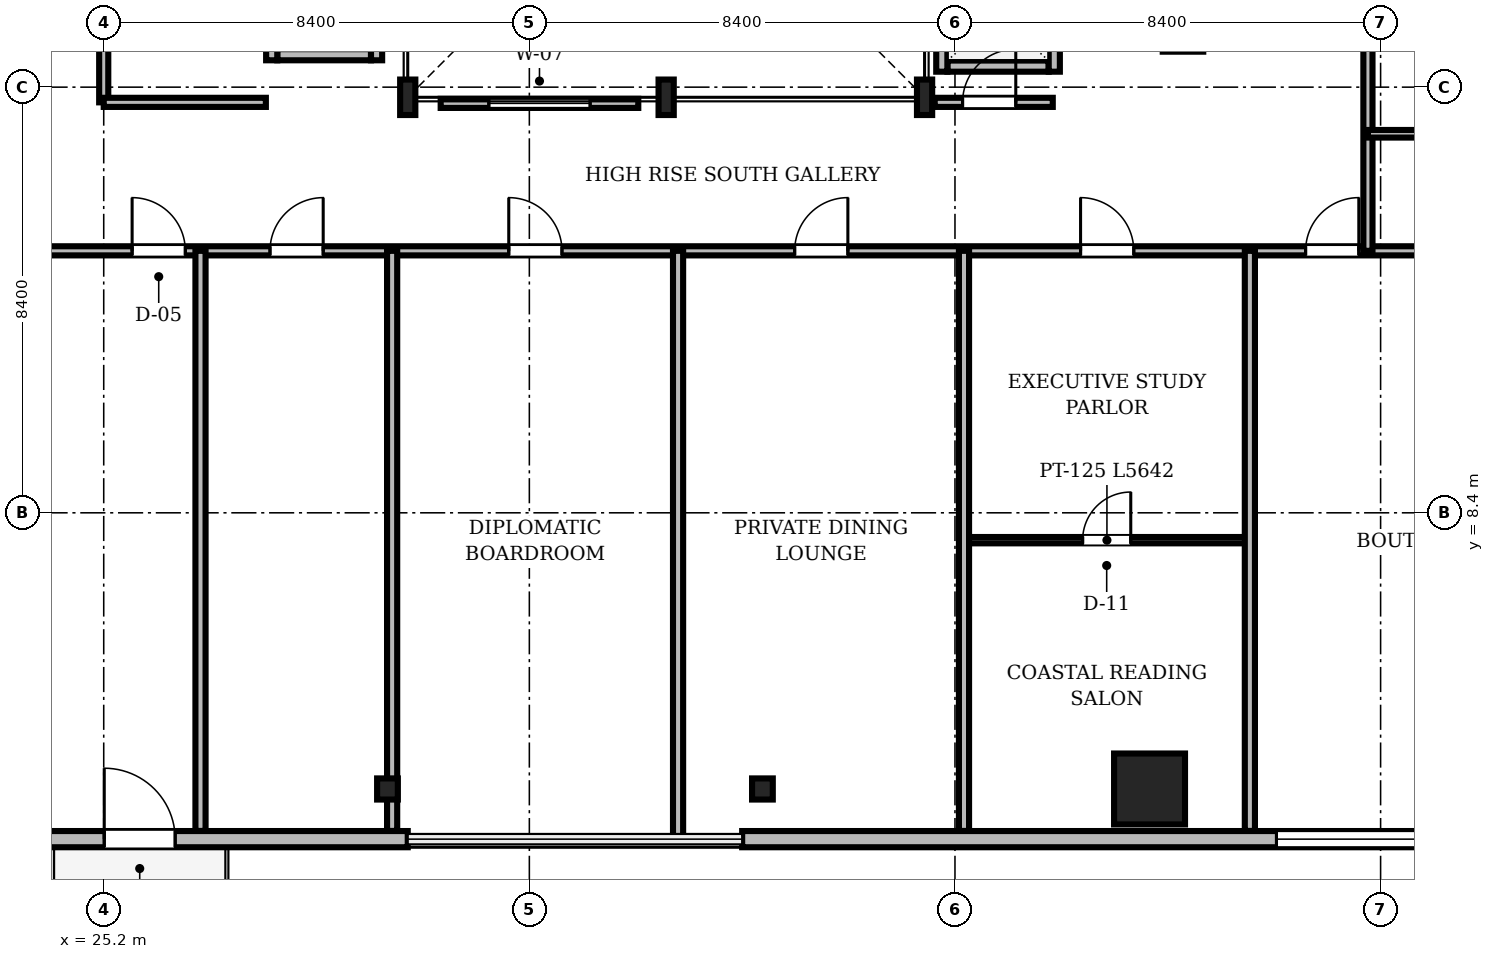
"""IFC4 building model, lengths in metres.
Left out: names, types, materials, properties, quantities, classifications, styles, units other than length and angle.
Written with IfcOpenShell. Run it as: python <this file> out.ifc"""

import sys

from ifc_helpers import new_model, si_unit, direction, frame, frame_2d, origin, origin_2d, place, context, subcontext, project, spatial, rectangle, i_section, extrude, source, transform, mapped, element, fill, save


model = new_model("IFC4")
c1 = context("Model", 3, precision=1e-05, world=origin(), true_north=direction((0.0, 1.0)))
c2 = subcontext(c1, "Body", "Model", "MODEL_VIEW")
j1 = project(units=[si_unit("LENGTHUNIT", "METRE"), si_unit("PLANEANGLEUNIT", "RADIAN")], contexts=[c1])
p1 = place(None, origin())
s1 = spatial("IfcSite", under=j1, at=p1, CompositionType="ELEMENT")
p2 = place(p1, origin())
s2 = spatial("IfcBuilding", under=s1, at=p2, CompositionType="ELEMENT")
p3 = place(p2, frame((0.0, 0.0, 233.55)))
s3 = spatial("IfcBuildingStorey", under=s2, at=p3, CompositionType="ELEMENT", Elevation=233.55)
m1 = source(origin(), c2, "Body", "SweptSolid", [
    extrude(i_section(OverallWidth=0.3, OverallDepth=0.7, WebThickness=0.017, FlangeThickness=0.032, FilletRadius=0.027, at=origin_2d()), origin(), (0.0, 0.0, 1.0), 3.1),
])
for number, where, z_axis, x_axis in (
    (1, (31.2, 16.6, 0.0), (0.0, 0.0, 1.0), (1.0, 0.0, 0.0)),
    (2, (36.3, 16.6, 0.0), (0.0, 0.0, 1.0), (1.0, 0.0, 0.0)),
    (3, (41.4, 16.6, 0.0), (0.0, 0.0, 1.0), (1.0, 0.0, 0.0)),
):
    element("IfcColumn", number, at=place(p3, frame(where, z_axis=z_axis, x_axis=x_axis)), inside=s3, PredefinedType="COLUMN", context=c2, shape_type="MappedRepresentation", body=[
        mapped(m1, transform((0.0, 0.0, 0.0), scale=1.0)),
    ])
m2 = source(origin(), c2, "Body", "SweptSolid", [
    extrude(rectangle(XDim=1.4, YDim=1.4, at=origin_2d()), origin(), (0.0, 0.0, 1.0), 3.1),
])
p4 = place(p3, frame((45.84, 2.95, 0.0), z_axis=(0.0, 0.0, 1.0), x_axis=(1.0, 0.0, 0.0)))
e4 = element("IfcColumn", 4, at=p4, inside=s3, PredefinedType="COLUMN", context=c2, shape_type="MappedRepresentation", body=[
    mapped(m2, transform((0.0, 0.0, 0.0), scale=1.0)),
])
m3 = source(origin(), c2, "Body", "SweptSolid", [
    extrude(i_section(OverallWidth=0.409, OverallDepth=0.417, WebThickness=0.021, FlangeThickness=0.033, FilletRadius=0.015, at=origin_2d()), origin(), (0.0, 0.0, 1.0), 3.1),
])
for number, where, z_axis, x_axis in (
    (5, (30.8, 2.95, 0.0), (0.0, 0.0, 1.0), (1.0, 0.0, 0.0)),
    (6, (38.2, 2.95, 0.0), (0.0, 0.0, 1.0), (1.0, 0.0, 0.0)),
):
    element("IfcColumn", number, at=place(p3, frame(where, z_axis=z_axis, x_axis=x_axis)), inside=s3, PredefinedType="COLUMN", context=c2, shape_type="MappedRepresentation", body=[
        mapped(m3, transform((0.0, 0.0, 0.0), scale=1.0)),
    ])
m4 = source(origin(), c2, "Body", "SweptSolid", [
    extrude(rectangle(XDim=15.6, YDim=0.32, at=frame_2d((7.8, 0.0))), origin(), (0.0, 0.0, 1.0), 3.1),
])
p5 = place(p3, frame((15.6, 1.96, 0.0), z_axis=(0.0, 0.0, 1.0), x_axis=(1.0, 0.0, 0.0)))
e7 = element("IfcWall", 7, at=p5, inside=s3, PredefinedType="SOLIDWALL", context=c2, shape_type="MappedRepresentation", body=[
    mapped(m4, transform((0.0, 0.0, 0.0), scale=1.0)),
])
m5 = source(origin(), c2, "Body", "SweptSolid", [
    extrude(rectangle(XDim=1.4, YDim=2.3, at=frame_2d((0.7, 1.15))), frame((0.0, 0.17, 0.0), z_axis=(0.0, -1.0, 0.0), x_axis=(1.0, 0.0, 0.0)), (0.0, 0.0, 1.0), 0.34),
])
p6 = place(p5, frame((9.61, 0.0, 0.0)))
e8 = element("IfcOpeningElement", 8, at=p6, cuts=e7, PredefinedType="OPENING", context=c2, shape_type="MappedRepresentation", body=[
    mapped(m5, transform((0.0, 0.0, 0.0), scale=1.0)),
])
m6 = source(origin(), c2, "Body", "SweptSolid", [
    extrude(rectangle(XDim=2.8, YDim=2.4, at=frame_2d((1.4, 1.2))), frame((0.0, 0.17, 0.0), z_axis=(0.0, -1.0, 0.0), x_axis=(1.0, 0.0, 0.0)), (0.0, 0.0, 1.0), 0.34),
])
p7 = place(p5, frame((2.705, 0.0, 0.44)))
e9 = element("IfcOpeningElement", 9, at=p7, cuts=e7, PredefinedType="OPENING", context=c2, shape_type="MappedRepresentation", body=[
    mapped(m6, transform((0.0, 0.0, 0.0), scale=1.0)),
])
p8 = place(p3, frame((37.8, 1.96, 0.0), z_axis=(0.0, 0.0, 1.0), x_axis=(1.0, 0.0, 0.0)))
e10 = element("IfcWall", 10, at=p8, inside=s3, PredefinedType="SOLIDWALL", context=c2, shape_type="MappedRepresentation", body=[
    mapped(m4, transform((0.0, 0.0, 0.0), scale=1.0)),
])
p9 = place(p8, frame((10.545, 0.0, 0.44)))
e11 = element("IfcOpeningElement", 11, at=p9, cuts=e10, PredefinedType="OPENING", context=c2, shape_type="MappedRepresentation", body=[
    mapped(m6, transform((0.0, 0.0, 0.0), scale=1.0)),
])
m7 = source(origin(), c2, "Body", "SweptSolid", [
    extrude(rectangle(XDim=2.0, YDim=0.22, at=frame_2d((1.0, 0.0))), origin(), (0.0, 0.0, 1.0), 3.1),
])
p10 = place(p3, frame((41.85, 17.215, 0.0), z_axis=(0.0, 0.0, 1.0), x_axis=(1.0, 0.0, 0.0)))
e12 = element("IfcWall", 12, at=p10, inside=s3, PredefinedType="SOLIDWALL", context=c2, shape_type="MappedRepresentation", body=[
    mapped(m7, transform((0.0, 0.0, 0.0), scale=1.0)),
])
m8 = source(origin(), c2, "Body", "SweptSolid", [
    extrude(rectangle(XDim=2.19, YDim=0.22, at=frame_2d((1.095, 0.0))), origin(), (0.0, 0.0, 1.0), 3.1),
])
p11 = place(p3, frame((41.74, 17.105, 0.0), z_axis=(0.0, 0.0, 1.0), x_axis=(0.0, 1.0, 0.0)))
e13 = element("IfcWall", 13, at=p11, inside=s3, PredefinedType="SOLIDWALL", context=c2, shape_type="MappedRepresentation", body=[
    mapped(m8, transform((0.0, 0.0, 0.0), scale=1.0)),
])
p12 = place(p3, frame((43.96, 17.105, 0.0), z_axis=(0.0, 0.0, 1.0), x_axis=(0.0, 1.0, 0.0)))
e14 = element("IfcWall", 14, at=p12, inside=s3, PredefinedType="SOLIDWALL", context=c2, shape_type="MappedRepresentation", body=[
    mapped(m8, transform((0.0, 0.0, 0.0), scale=1.0)),
])
m9 = source(origin(), c2, "Body", "SweptSolid", [
    extrude(rectangle(XDim=1.1, YDim=2.2, at=frame_2d((0.55, 1.1))), frame((0.0, 0.12, 0.0), z_axis=(0.0, -1.0, 0.0), x_axis=(1.0, 0.0, 0.0)), (0.0, 0.0, 1.0), 0.24),
])
p13 = place(p12, frame((0.545, 0.0, 0.0)))
e15 = element("IfcOpeningElement", 15, at=p13, cuts=e14, PredefinedType="OPENING", context=c2, shape_type="MappedRepresentation", body=[
    mapped(m9, transform((0.0, 0.0, 0.0), scale=1.0)),
])
m10 = source(origin(), c2, "Body", "SweptSolid", [
    extrude(rectangle(XDim=1.85, YDim=0.22, at=frame_2d((0.925, 0.0))), origin(), (0.0, 0.0, 1.0), 2.542),
])
p14 = place(p3, frame((28.625, 17.44, 0.0), z_axis=(0.0, 0.0, 1.0), x_axis=(1.0, 0.0, 0.0)))
e16 = element("IfcWall", 16, at=p14, inside=s3, PredefinedType="SOLIDWALL", context=c2, shape_type="MappedRepresentation", body=[
    mapped(m10, transform((0.0, 0.0, 0.0), scale=1.0)),
])
m11 = source(origin(), c2, "Body", "SweptSolid", [
    extrude(rectangle(XDim=2.54, YDim=0.22, at=frame_2d((1.27, 0.0))), origin(), (0.0, 0.0, 1.0), 2.542),
])
p15 = place(p3, frame((28.515, 17.33, 0.0), z_axis=(0.0, 0.0, 1.0), x_axis=(0.0, 1.0, 0.0)))
e17 = element("IfcWall", 17, at=p15, inside=s3, PredefinedType="SOLIDWALL", context=c2, shape_type="MappedRepresentation", body=[
    mapped(m11, transform((0.0, 0.0, 0.0), scale=1.0)),
])
m12 = source(origin(), c2, "Body", "SweptSolid", [
    extrude(rectangle(XDim=2.54, YDim=0.22, at=frame_2d((1.27, 0.0))), origin(), (0.0, 0.0, 1.0), 3.1),
])
p16 = place(p3, frame((30.585, 17.33, 0.0), z_axis=(0.0, 0.0, 1.0), x_axis=(0.0, 1.0, 0.0)))
e18 = element("IfcWall", 18, at=p16, inside=s3, PredefinedType="SOLIDWALL", context=c2, shape_type="MappedRepresentation", body=[
    mapped(m12, transform((0.0, 0.0, 0.0), scale=1.0)),
])
m13 = source(origin(), c2, "Body", "SweptSolid", [
    extrude(rectangle(XDim=46.156, YDim=0.18, at=frame_2d((23.078, 0.0))), origin(), (0.0, 0.0, 1.0), 2.376),
])
p17 = place(p3, frame((11.422, 13.57, 0.0), z_axis=(0.0, 0.0, 1.0), x_axis=(1.0, 0.0, 0.0)))
e19 = element("IfcWall", 19, at=p17, inside=s3, PredefinedType="PARTITIONING", context=c2, shape_type="MappedRepresentation", body=[
    mapped(m13, transform((0.0, 0.0, 0.0), scale=1.0)),
])
m14 = source(origin(), c2, "Body", "SweptSolid", [
    extrude(rectangle(XDim=1.05, YDim=2.2, at=frame_2d((0.525, 1.1))), frame((0.0, 0.1, 0.0), z_axis=(0.0, -1.0, 0.0), x_axis=(1.0, 0.0, 0.0)), (0.0, 0.0, 1.0), 0.2),
])
p18 = place(p17, frame((14.338, 0.0, 0.0)))
e20 = element("IfcOpeningElement", 20, at=p18, cuts=e19, PredefinedType="OPENING", context=c2, shape_type="MappedRepresentation", body=[
    mapped(m14, transform((0.0, 0.0, 0.0), scale=1.0)),
])
p19 = place(p17, frame((17.059, 0.0, 0.0)))
e21 = element("IfcOpeningElement", 21, at=p19, cuts=e19, PredefinedType="OPENING", context=c2, shape_type="MappedRepresentation", body=[
    mapped(m14, transform((0.0, 0.0, 0.0), scale=1.0)),
])
p20 = place(p17, frame((21.772, 0.0, 0.0)))
e22 = element("IfcOpeningElement", 22, at=p20, cuts=e19, PredefinedType="OPENING", context=c2, shape_type="MappedRepresentation", body=[
    mapped(m14, transform((0.0, 0.0, 0.0), scale=1.0)),
])
p21 = place(p17, frame((27.414, 0.0, 0.0)))
e23 = element("IfcOpeningElement", 23, at=p21, cuts=e19, PredefinedType="OPENING", context=c2, shape_type="MappedRepresentation", body=[
    mapped(m14, transform((0.0, 0.0, 0.0), scale=1.0)),
])
p22 = place(p17, frame((33.057, 0.0, 0.0)))
e24 = element("IfcOpeningElement", 24, at=p22, cuts=e19, PredefinedType="OPENING", context=c2, shape_type="MappedRepresentation", body=[
    mapped(m14, transform((0.0, 0.0, 0.0), scale=1.0)),
])
p23 = place(p17, frame((37.498, 0.0, 0.0)))
e25 = element("IfcOpeningElement", 25, at=p23, cuts=e19, PredefinedType="OPENING", context=c2, shape_type="MappedRepresentation", body=[
    mapped(m14, transform((0.0, 0.0, 0.0), scale=1.0)),
])
m15 = source(origin(), c2, "Body", "SweptSolid", [
    extrude(rectangle(XDim=27.53, YDim=0.18, at=frame_2d((13.765, 0.0))), origin(), (0.0, 0.0, 1.0), 2.542),
])
p24 = place(p3, frame((50.15, 13.57, 0.0), z_axis=(0.0, 0.0, 1.0), x_axis=(0.0, 1.0, 0.0)))
e26 = element("IfcWall", 26, at=p24, inside=s3, PredefinedType="PARTITIONING", context=c2, shape_type="MappedRepresentation", body=[
    mapped(m15, transform((0.0, 0.0, 0.0), scale=1.0)),
])
p25 = place(p24, frame((5.217, 0.0, 0.0)))
e27 = element("IfcOpeningElement", 27, at=p25, cuts=e26, PredefinedType="OPENING", context=c2, shape_type="MappedRepresentation", body=[
    mapped(m14, transform((0.0, 0.0, 0.0), scale=1.0)),
])
p26 = place(p24, frame((14.32, 0.0, 0.0)))
e28 = element("IfcOpeningElement", 28, at=p26, cuts=e26, PredefinedType="OPENING", context=c2, shape_type="MappedRepresentation", body=[
    mapped(m14, transform((0.0, 0.0, 0.0), scale=1.0)),
])
p27 = place(p24, frame((23.423, 0.0, 0.0)))
e29 = element("IfcOpeningElement", 29, at=p27, cuts=e26, PredefinedType="OPENING", context=c2, shape_type="MappedRepresentation", body=[
    mapped(m14, transform((0.0, 0.0, 0.0), scale=1.0)),
])
m16 = source(origin(), c2, "Body", "SweptSolid", [
    extrude(rectangle(XDim=11.94, YDim=0.18, at=frame_2d((5.97, 0.0))), origin(), (0.0, 0.0, 1.0), 2.542),
])
p28 = place(p3, frame((25.2, 16.5, 0.0), z_axis=(0.0, 0.0, 1.0), x_axis=(0.0, 1.0, 0.0)))
e30 = element("IfcWall", 30, at=p28, inside=s3, PredefinedType="PARTITIONING", context=c2, shape_type="MappedRepresentation", body=[
    mapped(m16, transform((0.0, 0.0, 0.0), scale=1.0)),
])
p29 = place(p28, frame((4.5, 0.0, 0.0)))
e31 = element("IfcOpeningElement", 31, at=p29, cuts=e30, PredefinedType="OPENING", context=c2, shape_type="MappedRepresentation", body=[
    mapped(m14, transform((0.0, 0.0, 0.0), scale=1.0)),
])
m17 = source(origin(), c2, "Body", "SweptSolid", [
    extrude(rectangle(XDim=5.642, YDim=0.125, at=frame_2d((2.821, 0.0))), origin(), (0.0, 0.0, 1.0), 2.542),
])
p30 = place(p3, frame((42.178, 7.86, 0.0), z_axis=(0.0, 0.0, 1.0), x_axis=(1.0, 0.0, 0.0)))
e32 = element("IfcWall", 32, at=p30, inside=s3, PredefinedType="PARTITIONING", context=c2, shape_type="MappedRepresentation", body=[
    mapped(m17, transform((0.0, 0.0, 0.0), scale=1.0)),
])
m18 = source(origin(), c2, "Body", "SweptSolid", [
    extrude(rectangle(XDim=0.95, YDim=2.15, at=frame_2d((0.475, 1.075))), frame((0.0, 0.073, 0.0), z_axis=(0.0, -1.0, 0.0), x_axis=(1.0, 0.0, 0.0)), (0.0, 0.0, 1.0), 0.145),
])
p31 = place(p30, frame((2.341, 0.0, 0.0)))
e33 = element("IfcOpeningElement", 33, at=p31, cuts=e32, PredefinedType="OPENING", context=c2, shape_type="MappedRepresentation", body=[
    mapped(m18, transform((0.0, 0.0, 0.0), scale=1.0)),
])
m19 = source(origin(), c2, "Body", "SweptSolid", [
    extrude(rectangle(XDim=2.33, YDim=0.18, at=frame_2d((1.165, 0.0))), origin(), (0.0, 0.0, 1.0), 2.542),
])
p32 = place(p3, frame((41.6, 16.5, 0.0), z_axis=(0.0, 0.0, 1.0), x_axis=(1.0, 0.0, 0.0)))
e34 = element("IfcWall", 34, at=p32, inside=s3, PredefinedType="PARTITIONING", context=c2, shape_type="MappedRepresentation", body=[
    mapped(m19, transform((0.0, 0.0, 0.0), scale=1.0)),
])
p33 = place(p32, frame((0.55, 0.0, 0.0)))
e35 = element("IfcOpeningElement", 35, at=p33, cuts=e34, PredefinedType="OPENING", context=c2, shape_type="MappedRepresentation", body=[
    mapped(m14, transform((0.0, 0.0, 0.0), scale=1.0)),
])
m20 = source(origin(), c2, "Body", "SweptSolid", [
    extrude(rectangle(XDim=11.448, YDim=0.2, at=frame_2d((5.724, 0.0))), origin(), (0.0, 0.0, 1.0), 2.376),
])
for number, where, z_axis, x_axis in (
    (36, (27.11, 2.122, 0.0), (0.0, 0.0, 1.0), (0.0, 1.0, 0.0)),
    (37, (30.892, 2.122, 0.0), (0.0, 0.0, 1.0), (0.0, 1.0, 0.0)),
):
    element("IfcWall", number, at=place(p3, frame(where, z_axis=z_axis, x_axis=x_axis)), inside=s3, PredefinedType="PARTITIONING", context=c2, shape_type="MappedRepresentation", body=[
        mapped(m20, transform((0.0, 0.0, 0.0), scale=1.0)),
    ])
m21 = source(origin(), c2, "Body", "SweptSolid", [
    extrude(rectangle(XDim=11.64, YDim=0.2, at=frame_2d((5.82, 0.0))), origin(), (0.0, 0.0, 1.0), 2.376),
])
p34 = place(p3, frame((36.535, 1.93, 0.0), z_axis=(0.0, 0.0, 1.0), x_axis=(0.0, 1.0, 0.0)))
e38 = element("IfcWall", 38, at=p34, inside=s3, PredefinedType="PARTITIONING", context=c2, shape_type="MappedRepresentation", body=[
    mapped(m21, transform((0.0, 0.0, 0.0), scale=1.0)),
])
for number, where, z_axis, x_axis in (
    (39, (42.178, 2.122, 0.0), (0.0, 0.0, 1.0), (0.0, 1.0, 0.0)),
    (40, (47.82, 2.122, 0.0), (0.0, 0.0, 1.0), (0.0, 1.0, 0.0)),
):
    element("IfcWall", number, at=place(p3, frame(where, z_axis=z_axis, x_axis=x_axis)), inside=s3, PredefinedType="PARTITIONING", context=c2, shape_type="MappedRepresentation", body=[
        mapped(m20, transform((0.0, 0.0, 0.0), scale=1.0)),
    ])
m22 = source(origin(), c2, "Body", "SweptSolid", [
    extrude(rectangle(XDim=3.2, YDim=0.18, at=frame_2d((1.6, 0.0))), origin(), (0.0, 0.0, 1.0), 3.1),
])
p35 = place(p3, frame((25.2, 16.5, 0.0), z_axis=(0.0, 0.0, 1.0), x_axis=(1.0, 0.0, 0.0)))
e41 = element("IfcWall", 41, at=p35, inside=s3, PredefinedType="PARTITIONING", context=c2, shape_type="MappedRepresentation", body=[
    mapped(m22, transform((0.0, 0.0, 0.0), scale=1.0)),
])
m23 = source(origin(), c2, "Body", "SweptSolid", [
    extrude(rectangle(XDim=2.36, YDim=0.15, at=frame_2d((1.18, 0.0))), origin(), (0.0, 0.0, 1.0), 3.1),
])
p36 = place(p3, frame((50.15, 15.88, 0.0), z_axis=(0.0, 0.0, 1.0), x_axis=(1.0, 0.0, 0.0)))
e42 = element("IfcWall", 42, at=p36, inside=s3, PredefinedType="PARTITIONING", context=c2, shape_type="MappedRepresentation", body=[
    mapped(m23, transform((0.0, 0.0, 0.0), scale=1.0)),
])
m24 = source(origin(), c2, "Body", "SweptSolid", [
    extrude(rectangle(XDim=3.9, YDim=0.18, at=frame_2d((1.95, 0.0))), origin(), (0.0, 0.0, 1.0), 2.642),
])
p37 = place(p3, frame((31.85, 16.48, 0.0), z_axis=(0.0, 0.0, 1.0), x_axis=(1.0, 0.0, 0.0)))
e43 = element("IfcWall", 43, at=p37, inside=s3, PredefinedType="PARTITIONING", context=c2, shape_type="MappedRepresentation", body=[
    mapped(m24, transform((0.0, 0.0, 0.0), scale=1.0)),
])
m25 = source(origin(), c2, "Body", "SweptSolid", [
    extrude(rectangle(XDim=2.0, YDim=1.9, at=frame_2d((1.0, 0.95))), frame((0.0, 0.1, 0.0), z_axis=(0.0, -1.0, 0.0), x_axis=(1.0, 0.0, 0.0)), (0.0, 0.0, 1.0), 0.2),
])
p38 = place(p37, frame((0.95, 0.0, 0.55)))
e44 = element("IfcOpeningElement", 44, at=p38, cuts=e43, PredefinedType="OPENING", context=c2, shape_type="MappedRepresentation", body=[
    mapped(m25, transform((0.0, 0.0, 0.0), scale=1.0)),
])
m26 = source(origin(), c2, "Body", "SweptSolid", [
    extrude(rectangle(XDim=1.4, YDim=2.3, at=frame_2d((0.7, 1.15))), frame((0.0, 0.025, 0.0), z_axis=(0.0, -1.0, 0.0), x_axis=(1.0, 0.0, 0.0)), (0.0, 0.0, 1.0), 0.05),
])
p39 = place(p6, frame((1.4, 0.0, 0.0), z_axis=(0.0, 0.0, 1.0), x_axis=(-1.0, 0.0, 0.0)))
e45 = element("IfcDoor", 45, at=p39, inside=s3, OperationType="DOUBLE_DOOR_SLIDING", PredefinedType="DOOR", context=c2, shape_type="MappedRepresentation", body=[
    mapped(m26, transform((0.0, 0.0, 0.0), scale=1.0)),
])
fill(e8, e45)
m27 = source(origin(), c2, "Body", "SweptSolid", [
    extrude(rectangle(XDim=2.8, YDim=2.4, at=frame_2d((1.4, 1.2))), frame((0.0, 0.03, 0.0), z_axis=(0.0, -1.0, 0.0), x_axis=(1.0, 0.0, 0.0)), (0.0, 0.0, 1.0), 0.06),
])
p40 = place(p9, origin())
e46 = element("IfcWindow", 46, at=p40, inside=s3, PartitioningType="SINGLE_PANEL", PredefinedType="WINDOW", context=c2, shape_type="MappedRepresentation", body=[
    mapped(m27, transform((0.0, 0.0, 0.0), scale=1.0)),
])
fill(e11, e46)
m28 = source(origin(), c2, "Body", "SweptSolid", [
    extrude(rectangle(XDim=1.05, YDim=2.2, at=frame_2d((0.525, 1.1))), frame((0.0, 0.025, 0.0), z_axis=(0.0, -1.0, 0.0), x_axis=(1.0, 0.0, 0.0)), (0.0, 0.0, 1.0), 0.05),
])
p41 = place(p18, origin())
e47 = element("IfcDoor", 47, at=p41, inside=s3, OperationType="SINGLE_SWING_LEFT", PredefinedType="DOOR", context=c2, shape_type="MappedRepresentation", body=[
    mapped(m28, transform((0.0, 0.0, 0.0), scale=1.0)),
])
fill(e20, e47)
p42 = place(p19, origin())
e48 = element("IfcDoor", 48, at=p42, inside=s3, OperationType="SINGLE_SWING_RIGHT", PredefinedType="DOOR", context=c2, shape_type="MappedRepresentation", body=[
    mapped(m28, transform((0.0, 0.0, 0.0), scale=1.0)),
])
fill(e21, e48)
p43 = place(p20, origin())
e49 = element("IfcDoor", 49, at=p43, inside=s3, OperationType="SINGLE_SWING_LEFT", PredefinedType="DOOR", context=c2, shape_type="MappedRepresentation", body=[
    mapped(m28, transform((0.0, 0.0, 0.0), scale=1.0)),
])
fill(e22, e49)
p44 = place(p21, origin())
e50 = element("IfcDoor", 50, at=p44, inside=s3, OperationType="SINGLE_SWING_RIGHT", PredefinedType="DOOR", context=c2, shape_type="MappedRepresentation", body=[
    mapped(m28, transform((0.0, 0.0, 0.0), scale=1.0)),
])
fill(e23, e50)
p45 = place(p22, origin())
e51 = element("IfcDoor", 51, at=p45, inside=s3, OperationType="SINGLE_SWING_LEFT", PredefinedType="DOOR", context=c2, shape_type="MappedRepresentation", body=[
    mapped(m28, transform((0.0, 0.0, 0.0), scale=1.0)),
])
fill(e24, e51)
p46 = place(p23, origin())
e52 = element("IfcDoor", 52, at=p46, inside=s3, OperationType="SINGLE_SWING_RIGHT", PredefinedType="DOOR", context=c2, shape_type="MappedRepresentation", body=[
    mapped(m28, transform((0.0, 0.0, 0.0), scale=1.0)),
])
fill(e25, e52)
m29 = source(origin(), c2, "Body", "SweptSolid", [
    extrude(rectangle(XDim=0.95, YDim=2.15, at=frame_2d((0.475, 1.075))), frame((0.0, 0.025, 0.0), z_axis=(0.0, -1.0, 0.0), x_axis=(1.0, 0.0, 0.0)), (0.0, 0.0, 1.0), 0.05),
])
p47 = place(p31, origin())
e53 = element("IfcDoor", 53, at=p47, inside=s3, OperationType="SINGLE_SWING_RIGHT", PredefinedType="DOOR", context=c2, shape_type="MappedRepresentation", body=[
    mapped(m29, transform((0.0, 0.0, 0.0), scale=1.0)),
])
fill(e33, e53)
p48 = place(p33, origin())
e54 = element("IfcDoor", 54, at=p48, inside=s3, OperationType="SINGLE_SWING_RIGHT", PredefinedType="DOOR", context=c2, shape_type="MappedRepresentation", body=[
    mapped(m28, transform((0.0, 0.0, 0.0), scale=1.0)),
])
fill(e35, e54)
m30 = source(origin(), c2, "Body", "SweptSolid", [
    extrude(rectangle(XDim=2.0, YDim=1.9, at=frame_2d((1.0, 0.95))), frame((0.0, 0.03, 0.0), z_axis=(0.0, -1.0, 0.0), x_axis=(1.0, 0.0, 0.0)), (0.0, 0.0, 1.0), 0.06),
])
p49 = place(p38, origin())
e55 = element("IfcWindow", 55, at=p49, inside=s3, PartitioningType="SINGLE_PANEL", PredefinedType="WINDOW", context=c2, shape_type="MappedRepresentation", body=[
    mapped(m30, transform((0.0, 0.0, 0.0), scale=1.0)),
])
fill(e44, e55)
save(model, sys.argv[1])
